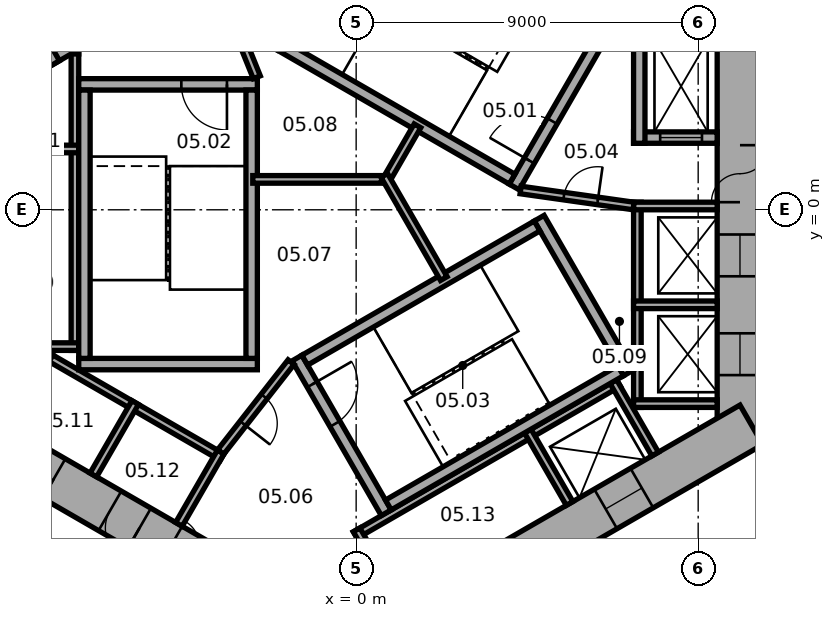
"""IFC4 building model, lengths in metres.
Left out: names, types, materials, properties, quantities, classifications, styles, units other than length and angle.
Written with IfcOpenShell. Run it as: python <this file> out.ifc"""

import sys

from ifc_helpers import new_model, si_unit, direction, frame, frame_2d, origin, place, context, subcontext, project, spatial, rectangle, extrude, element, fill, save


model = new_model("IFC4")
c1 = context("Model", 3, precision=1e-05, world=origin(), true_north=direction((0.0, 1.0)))
c2 = subcontext(c1, "Body", "Model", "MODEL_VIEW")
j1 = project(units=[si_unit("LENGTHUNIT", "METRE"), si_unit("PLANEANGLEUNIT", "RADIAN")], contexts=[c1])
p1 = place(None, origin())
s1 = spatial("IfcSite", under=j1, at=p1, CompositionType="ELEMENT")
p2 = place(p1, origin())
s2 = spatial("IfcBuilding", under=s1, at=p2, CompositionType="ELEMENT")
p3 = place(p2, frame((0.0, 0.0, 34.5)))
s3 = spatial("IfcBuildingStorey", under=s2, at=p3, CompositionType="ELEMENT", Elevation=34.5)
p4 = place(p3, frame((10.1, -6.177, 0.0), z_axis=(0.0, 0.0, 1.0), x_axis=(0.0, 1.0, 0.0)))
e1 = element("IfcWall", 1, at=p4, inside=s3, PredefinedType="SHEAR", context=c2, shape_type="SweptSolid", body=[
    extrude(rectangle(XDim=12.355, YDim=1.2, at=frame_2d((6.177, 0.0))), origin(), (0.0, 0.0, 1.0), 4.5),
])
p5 = place(p4, frame((6.378, 0.0, 0.0)))
e2 = element("IfcOpeningElement", 2, at=p5, cuts=e1, PredefinedType="OPENING", context=c2, shape_type="SweptSolid", body=[
    extrude(rectangle(XDim=1.5, YDim=2.1, at=frame_2d((0.75, 1.05))), frame((0.0, 0.61, 0.0), z_axis=(0.0, -1.0, 0.0), x_axis=(1.0, 0.0, 0.0)), (0.0, 0.0, 1.0), 1.22),
])
p6 = place(p4, frame((1.828, 0.0, 0.0)))
e3 = element("IfcOpeningElement", 3, at=p6, cuts=e1, PredefinedType="OPENING", context=c2, shape_type="SweptSolid", body=[
    extrude(rectangle(XDim=1.1, YDim=2.1, at=frame_2d((0.55, 1.05))), frame((0.0, 0.61, 0.0), z_axis=(0.0, -1.0, 0.0), x_axis=(1.0, 0.0, 0.0)), (0.0, 0.0, 1.0), 1.22),
])
p7 = place(p4, frame((4.427, 0.0, 0.0)))
e4 = element("IfcOpeningElement", 4, at=p7, cuts=e1, PredefinedType="OPENING", context=c2, shape_type="SweptSolid", body=[
    extrude(rectangle(XDim=1.1, YDim=2.1, at=frame_2d((0.55, 1.05))), frame((0.0, 0.61, 0.0), z_axis=(0.0, -1.0, 0.0), x_axis=(1.0, 0.0, 0.0)), (0.0, 0.0, 1.0), 1.22),
])
p8 = place(p3, frame((-10.4, -5.658, 0.0), z_axis=(0.0, 0.0, 1.0), x_axis=(0.866021384402, -0.500006961711, 0.0)))
e5 = element("IfcWall", 5, at=p8, inside=s3, PredefinedType="SHEAR", context=c2, shape_type="SweptSolid", body=[
    extrude(rectangle(XDim=12.355, YDim=1.2, at=frame_2d((6.178, 0.0))), origin(), (0.0, 0.0, 1.0), 4.5),
])
p9 = place(p8, frame((6.378, 0.0, 0.0)))
e6 = element("IfcOpeningElement", 6, at=p9, cuts=e5, PredefinedType="OPENING", context=c2, shape_type="SweptSolid", body=[
    extrude(rectangle(XDim=1.5, YDim=2.1, at=frame_2d((0.75, 1.05))), frame((0.0, 0.61, 0.0), z_axis=(0.0, -1.0, 0.0), x_axis=(1.0, 0.0, 0.0)), (0.0, 0.0, 1.0), 1.22),
])
p10 = place(p8, frame((1.928, 0.0, 0.0)))
e7 = element("IfcOpeningElement", 7, at=p10, cuts=e5, PredefinedType="OPENING", context=c2, shape_type="SweptSolid", body=[
    extrude(rectangle(XDim=0.9, YDim=2.1, at=frame_2d((0.45, 1.05))), frame((0.0, 0.61, 0.0), z_axis=(0.0, -1.0, 0.0), x_axis=(1.0, 0.0, 0.0)), (0.0, 0.0, 1.0), 1.22),
])
p11 = place(p8, frame((4.528, 0.0, 0.0)))
e8 = element("IfcOpeningElement", 8, at=p11, cuts=e5, PredefinedType="OPENING", context=c2, shape_type="SweptSolid", body=[
    extrude(rectangle(XDim=0.9, YDim=2.1, at=frame_2d((0.45, 1.05))), frame((0.0, 0.61, 0.0), z_axis=(0.0, -1.0, 0.0), x_axis=(1.0, 0.0, 0.0)), (0.0, 0.0, 1.0), 1.22),
])
p12 = place(p3, frame((-0.3, -11.836, 0.0), z_axis=(0.0, 0.0, 1.0), x_axis=(0.866021384402, 0.500006961711, 0.0)))
e9 = element("IfcWall", 9, at=p12, inside=s3, PredefinedType="SHEAR", context=c2, shape_type="SweptSolid", body=[
    extrude(rectangle(XDim=12.355, YDim=1.2, at=frame_2d((6.178, 0.0))), origin(), (0.0, 0.0, 1.0), 4.5),
])
p13 = place(p12, frame((4.128, 0.0, 0.0)))
e10 = element("IfcOpeningElement", 10, at=p13, cuts=e9, PredefinedType="OPENING", context=c2, shape_type="SweptSolid", body=[
    extrude(rectangle(XDim=0.9, YDim=2.1, at=frame_2d((0.45, 1.05))), frame((0.0, 0.61, 0.0), z_axis=(0.0, -1.0, 0.0), x_axis=(1.0, 0.0, 0.0)), (0.0, 0.0, 1.0), 1.22),
])
p14 = place(p12, frame((7.928, 0.0, 0.0)))
e11 = element("IfcOpeningElement", 11, at=p14, cuts=e9, PredefinedType="OPENING", context=c2, shape_type="SweptSolid", body=[
    extrude(rectangle(XDim=1.1, YDim=2.1, at=frame_2d((0.55, 1.05))), frame((0.0, 0.61, 0.0), z_axis=(0.0, -1.0, 0.0), x_axis=(1.0, 0.0, 0.0)), (0.0, 0.0, 1.0), 1.22),
])
p15 = place(p3, frame((7.4, -5.2, 0.0), z_axis=(0.0, 0.0, 1.0), x_axis=(0.0, 1.0, 0.0)))
e12 = element("IfcWall", 12, at=p15, inside=s3, PredefinedType="PARTITIONING", context=c2, shape_type="SweptSolid", body=[
    extrude(rectangle(XDim=5.4, YDim=0.2, at=frame_2d((2.7, 0.0))), origin(), (0.0, 0.0, 1.0), 4.2),
])
for number, where, z_axis, x_axis in (
    (13, (7.3, -5.1, 0.0), (0.0, 0.0, 1.0), (1.0, 0.0, 0.0)),
    (14, (7.3, -2.5, 0.0), (0.0, 0.0, 1.0), (1.0, 0.0, 0.0)),
    (15, (7.3, 0.1, 0.0), (0.0, 0.0, 1.0), (1.0, 0.0, 0.0)),
):
    element("IfcWall", number, at=place(p3, frame(where, z_axis=z_axis, x_axis=x_axis)), inside=s3, PredefinedType="PARTITIONING", context=c2, shape_type="SweptSolid", body=[
        extrude(rectangle(XDim=2.2, YDim=0.2, at=frame_2d((1.1, 0.0))), origin(), (0.0, 0.0, 1.0), 4.2),
    ])
p16 = place(p3, frame((-7.4, 4.3, 0.0), z_axis=(0.0, 0.0, 1.0), x_axis=(0.0, -1.0, 0.0)))
e16 = element("IfcWall", 16, at=p16, inside=s3, PredefinedType="PARTITIONING", context=c2, shape_type="SweptSolid", body=[
    extrude(rectangle(XDim=8.0, YDim=0.2, at=frame_2d((4.0, 0.0))), origin(), (0.0, 0.0, 1.0), 4.2),
])
for number, where, z_axis, x_axis in (
    (17, (-7.3, 4.2, 0.0), (0.0, 0.0, 1.0), (-1.0, 0.0, 0.0)),
    (18, (-7.3, 1.6, 0.0), (0.0, 0.0, 1.0), (-1.0, 0.0, 0.0)),
    (19, (-7.3, -3.6, 0.0), (0.0, 0.0, 1.0), (-1.0, 0.0, 0.0)),
):
    element("IfcWall", number, at=place(p3, frame(where, z_axis=z_axis, x_axis=x_axis)), inside=s3, PredefinedType="PARTITIONING", context=c2, shape_type="SweptSolid", body=[
        extrude(rectangle(XDim=2.2, YDim=0.2, at=frame_2d((1.1, 0.0))), origin(), (0.0, 0.0, 1.0), 4.2),
    ])
p17 = place(p3, frame((-8.203, -3.809, 0.0), z_axis=(0.0, 0.0, 1.0), x_axis=(0.866028230842, -0.499995103361, 0.0)))
e20 = element("IfcWall", 20, at=p17, inside=s3, PredefinedType="PARTITIONING", context=c2, shape_type="SweptSolid", body=[
    extrude(rectangle(XDim=5.4, YDim=0.2, at=frame_2d((2.7, 0.0))), origin(), (0.0, 0.0, 1.0), 4.2),
])
for number, where, z_axis, x_axis in (
    (21, (-8.067, -3.772, 0.0), (0.0, 0.0, 1.0), (-0.5, -0.866, 0.0)),
    (22, (-5.815, -5.072, 0.0), (0.0, 0.0, 1.0), (-0.5, -0.866, 0.0)),
):
    element("IfcWall", number, at=place(p3, frame(where, z_axis=z_axis, x_axis=x_axis)), inside=s3, PredefinedType="PARTITIONING", context=c2, shape_type="SweptSolid", body=[
        extrude(rectangle(XDim=2.2, YDim=0.2, at=frame_2d((1.1, 0.0))), origin(), (0.0, 0.0, 1.0), 4.2),
    ])
p18 = place(p3, frame((-3.563, -6.372, 0.0), z_axis=(0.0, 0.0, 1.0), x_axis=(-0.499994660107, -0.866028486751, 0.0)))
e23 = element("IfcWall", 23, at=p18, inside=s3, PredefinedType="PARTITIONING", context=c2, shape_type="SweptSolid", body=[
    extrude(rectangle(XDim=2.2, YDim=0.2, at=frame_2d((1.1, 0.0))), origin(), (0.0, 0.0, 1.0), 4.2),
])
p19 = place(p3, frame((-0.024, -8.559, 0.0), z_axis=(0.0, 0.0, 1.0), x_axis=(0.866026010844, 0.49999894854, 0.0)))
e24 = element("IfcWall", 24, at=p19, inside=s3, PredefinedType="PARTITIONING", context=c2, shape_type="SweptSolid", body=[
    extrude(rectangle(XDim=8.0, YDim=0.2, at=frame_2d((4.0, 0.0))), origin(), (0.0, 0.0, 1.0), 4.2),
])
for number, where, z_axis, x_axis in (
    (25, (0.013, -8.422, 0.0), (0.0, 0.0, 1.0), (0.5, -0.866, 0.0)),
    (26, (4.516, -5.822, 0.0), (0.0, 0.0, 1.0), (0.5, -0.866, 0.0)),
    (27, (6.768, -4.522, 0.0), (0.0, 0.0, 1.0), (0.5, -0.866, 0.0)),
):
    element("IfcWall", number, at=place(p3, frame(where, z_axis=z_axis, x_axis=x_axis)), inside=s3, PredefinedType="PARTITIONING", context=c2, shape_type="SweptSolid", body=[
        extrude(rectangle(XDim=2.2, YDim=0.2, at=frame_2d((1.1, 0.0))), origin(), (0.0, 0.0, 1.0), 4.2),
    ])
p20 = place(p3, frame((4.158, 0.602, 0.0), z_axis=(0.0, 0.0, 1.0), x_axis=(0.499977259774, 0.866038532462, 0.0)))
e28 = element("IfcWall", 28, at=p20, inside=s3, PredefinedType="SHEAR", context=c2, shape_type="SweptSolid", body=[
    extrude(rectangle(XDim=4.7, YDim=0.3, at=frame_2d((2.35, 0.0))), origin(), (0.0, 0.0, 1.0), 4.2),
])
p21 = place(p20, frame((0.8, 0.0, 0.0)))
e29 = element("IfcOpeningElement", 29, at=p21, cuts=e28, PredefinedType="OPENING", context=c2, shape_type="SweptSolid", body=[
    extrude(rectangle(XDim=1.2, YDim=2.1, at=frame_2d((0.6, 1.05))), frame((0.0, 0.16, 0.0), z_axis=(0.0, -1.0, 0.0), x_axis=(1.0, 0.0, 0.0)), (0.0, 0.0, 1.0), 0.32),
])
p22 = place(p3, frame((4.103, 0.807, 0.0), z_axis=(0.0, 0.0, 1.0), x_axis=(-0.866027801685, 0.499995846692, 0.0)))
e30 = element("IfcWall", 30, at=p22, inside=s3, PredefinedType="SHEAR", context=c2, shape_type="SweptSolid", body=[
    extrude(rectangle(XDim=7.06, YDim=0.3, at=frame_2d((3.53, 0.0))), origin(), (0.0, 0.0, 1.0), 4.2),
])
p23 = place(p3, frame((-2.6, 3.3, 0.0), z_axis=(0.0, 0.0, 1.0), x_axis=(-1.0, 0.0, 0.0)))
e31 = element("IfcWall", 31, at=p23, inside=s3, PredefinedType="SHEAR", context=c2, shape_type="SweptSolid", body=[
    extrude(rectangle(XDim=4.7, YDim=0.3, at=frame_2d((2.35, 0.0))), origin(), (0.0, 0.0, 1.0), 4.2),
])
p24 = place(p23, frame((0.8, 0.0, 0.0)))
e32 = element("IfcOpeningElement", 32, at=p24, cuts=e31, PredefinedType="OPENING", context=c2, shape_type="SweptSolid", body=[
    extrude(rectangle(XDim=1.2, YDim=2.1, at=frame_2d((0.6, 1.05))), frame((0.0, 0.16, 0.0), z_axis=(0.0, -1.0, 0.0), x_axis=(1.0, 0.0, 0.0)), (0.0, 0.0, 1.0), 0.32),
])
p25 = place(p3, frame((-2.6, -4.06, 0.0), z_axis=(0.0, 0.0, 1.0), x_axis=(-1.0, 0.0, 0.0)))
e33 = element("IfcWall", 33, at=p25, inside=s3, PredefinedType="SHEAR", context=c2, shape_type="SweptSolid", body=[
    extrude(rectangle(XDim=4.7, YDim=0.3, at=frame_2d((2.35, 0.0))), origin(), (0.0, 0.0, 1.0), 4.2),
])
for number, where, z_axis, x_axis in (
    (34, (-2.75, 3.15, 0.0), (0.0, 0.0, 1.0), (0.0, -1.0, 0.0)),
    (35, (-7.15, 3.15, 0.0), (0.0, 0.0, 1.0), (0.0, -1.0, 0.0)),
):
    element("IfcWall", number, at=place(p3, frame(where, z_axis=z_axis, x_axis=x_axis)), inside=s3, PredefinedType="SHEAR", context=c2, shape_type="SweptSolid", body=[
        extrude(rectangle(XDim=7.06, YDim=0.3, at=frame_2d((3.53, 0.0))), origin(), (0.0, 0.0, 1.0), 4.2),
    ])
p26 = place(p3, frame((-1.558, -3.902, 0.0), z_axis=(0.0, 0.0, 1.0), x_axis=(0.499977259774, -0.866038532462, 0.0)))
e36 = element("IfcWall", 36, at=p26, inside=s3, PredefinedType="SHEAR", context=c2, shape_type="SweptSolid", body=[
    extrude(rectangle(XDim=4.7, YDim=0.3, at=frame_2d((2.35, 0.0))), origin(), (0.0, 0.0, 1.0), 4.2),
])
p27 = place(p26, frame((0.8, 0.0, 0.0)))
e37 = element("IfcOpeningElement", 37, at=p27, cuts=e36, PredefinedType="OPENING", context=c2, shape_type="SweptSolid", body=[
    extrude(rectangle(XDim=1.2, YDim=2.1, at=frame_2d((0.6, 1.05))), frame((0.0, 0.16, 0.0), z_axis=(0.0, -1.0, 0.0), x_axis=(1.0, 0.0, 0.0)), (0.0, 0.0, 1.0), 0.32),
])
p28 = place(p3, frame((4.816, -0.222, 0.0), z_axis=(0.0, 0.0, 1.0), x_axis=(0.499977259774, -0.866038532462, 0.0)))
e38 = element("IfcWall", 38, at=p28, inside=s3, PredefinedType="SHEAR", context=c2, shape_type="SweptSolid", body=[
    extrude(rectangle(XDim=4.7, YDim=0.3, at=frame_2d((2.35, 0.0))), origin(), (0.0, 0.0, 1.0), 4.2),
])
for number, where, z_axis, x_axis in (
    (39, (-1.353, -3.957, 0.0), (0.0, 0.0, 1.0), (0.866, 0.5, 0.0)),
    (40, (0.847, -7.767, 0.0), (0.0, 0.0, 1.0), (0.866, 0.5, 0.0)),
):
    element("IfcWall", number, at=place(p3, frame(where, z_axis=z_axis, x_axis=x_axis)), inside=s3, PredefinedType="SHEAR", context=c2, shape_type="SweptSolid", body=[
        extrude(rectangle(XDim=7.06, YDim=0.3, at=frame_2d((3.53, 0.0))), origin(), (0.0, 0.0, 1.0), 4.2),
    ])
p29 = place(p3, frame((7.3, 1.9, 0.0), z_axis=(0.0, 0.0, 1.0), x_axis=(1.0, 0.0, 0.0)))
e41 = element("IfcWall", 41, at=p29, inside=s3, PredefinedType="SHEAR", context=c2, shape_type="SweptSolid", body=[
    extrude(rectangle(XDim=2.2, YDim=0.3, at=frame_2d((1.1, 0.0))), origin(), (0.0, 0.0, 1.0), 4.2),
])
p30 = place(p29, frame((0.7, 0.0, 0.0)))
e42 = element("IfcOpeningElement", 42, at=p30, cuts=e41, PredefinedType="OPENING", context=c2, shape_type="SweptSolid", body=[
    extrude(rectangle(XDim=1.1, YDim=2.1, at=frame_2d((0.55, 1.05))), frame((0.0, 0.16, 0.0), z_axis=(0.0, -1.0, 0.0), x_axis=(1.0, 0.0, 0.0)), (0.0, 0.0, 1.0), 0.32),
])
p31 = place(p3, frame((7.45, 1.75, 0.0), z_axis=(0.0, 0.0, 1.0), x_axis=(0.0, 1.0, 0.0)))
e43 = element("IfcWall", 43, at=p31, inside=s3, PredefinedType="SHEAR", context=c2, shape_type="SweptSolid", body=[
    extrude(rectangle(XDim=3.35, YDim=0.3, at=frame_2d((1.675, 0.0))), origin(), (0.0, 0.0, 1.0), 4.2),
])
p32 = place(p3, frame((4.327, 0.521, 0.0), z_axis=(0.0, 0.0, 1.0), x_axis=(0.990124376366, -0.14019172346, 0.0)))
e44 = element("IfcWall", 44, at=p32, inside=s3, PredefinedType="PARTITIONING", context=c2, shape_type="SweptSolid", body=[
    extrude(rectangle(XDim=3.002, YDim=0.2, at=frame_2d((1.501, 0.0))), origin(), (0.0, 0.0, 1.0), 4.2),
])
p33 = place(p32, frame((1.15, 0.0, 0.0)))
e45 = element("IfcOpeningElement", 45, at=p33, cuts=e44, PredefinedType="OPENING", context=c2, shape_type="SweptSolid", body=[
    extrude(rectangle(XDim=0.9, YDim=2.1, at=frame_2d((0.45, 1.05))), frame((0.0, 0.11, 0.0), z_axis=(0.0, -1.0, 0.0), x_axis=(1.0, 0.0, 0.0)), (0.0, 0.0, 1.0), 0.22),
])
p34 = place(p3, frame((-5.24, 5.577, 0.0), z_axis=(0.0, 0.0, 1.0), x_axis=(-0.866014461049, -0.500018952895, 0.0)))
e46 = element("IfcWall", 46, at=p34, inside=s3, PredefinedType="SHEAR", context=c2, shape_type="SweptSolid", body=[
    extrude(rectangle(XDim=3.35, YDim=0.3, at=frame_2d((1.675, 0.0))), origin(), (0.0, 0.0, 1.0), 4.2),
])
p35 = place(p3, frame((-7.937, 3.847, 0.0), z_axis=(0.0, 0.0, 1.0), x_axis=(-0.50002983664, 0.866008176907, 0.0)))
e47 = element("IfcWall", 47, at=p35, inside=s3, PredefinedType="SHEAR", context=c2, shape_type="SweptSolid", body=[
    extrude(rectangle(XDim=2.2, YDim=0.3, at=frame_2d((1.1, 0.0))), origin(), (0.0, 0.0, 1.0), 4.2),
])
p36 = place(p3, frame((-2.615, 3.487, 0.0), z_axis=(0.0, 0.0, 1.0), x_axis=(-0.373576831041, 0.92759924068, 0.0)))
e48 = element("IfcWall", 48, at=p36, inside=s3, PredefinedType="PARTITIONING", context=c2, shape_type="SweptSolid", body=[
    extrude(rectangle(XDim=3.002, YDim=0.2, at=frame_2d((1.501, 0.0))), origin(), (0.0, 0.0, 1.0), 4.2),
])
p37 = place(p36, frame((1.15, 0.0, 0.0)))
e49 = element("IfcOpeningElement", 49, at=p37, cuts=e48, PredefinedType="OPENING", context=c2, shape_type="SweptSolid", body=[
    extrude(rectangle(XDim=0.9, YDim=2.1, at=frame_2d((0.45, 1.05))), frame((0.0, 0.11, 0.0), z_axis=(0.0, -1.0, 0.0), x_axis=(1.0, 0.0, 0.0)), (0.0, 0.0, 1.0), 0.22),
])
p38 = place(p3, frame((-1.712, -4.008, 0.0), z_axis=(0.0, 0.0, 1.0), x_axis=(-0.616549420702, -0.787316208287, 0.0)))
e50 = element("IfcWall", 50, at=p38, inside=s3, PredefinedType="PARTITIONING", context=c2, shape_type="SweptSolid", body=[
    extrude(rectangle(XDim=3.002, YDim=0.2, at=frame_2d((1.501, 0.0))), origin(), (0.0, 0.0, 1.0), 4.2),
])
p39 = place(p38, frame((1.15, 0.0, 0.0)))
e51 = element("IfcOpeningElement", 51, at=p39, cuts=e50, PredefinedType="OPENING", context=c2, shape_type="SweptSolid", body=[
    extrude(rectangle(XDim=0.9, YDim=2.1, at=frame_2d((0.45, 1.05))), frame((0.0, 0.11, 0.0), z_axis=(0.0, -1.0, 0.0), x_axis=(1.0, 0.0, 0.0)), (0.0, 0.0, 1.0), 0.22),
])
p40 = place(p3, frame((0.92, 0.8, 0.0), z_axis=(0.0, 0.0, 1.0), x_axis=(-1.0, 0.0, 0.0)))
e52 = element("IfcWall", 52, at=p40, inside=s3, PredefinedType="PARTITIONING", context=c2, shape_type="SweptSolid", body=[
    extrude(rectangle(XDim=3.64, YDim=0.2, at=frame_2d((1.82, 0.0))), origin(), (0.0, 0.0, 1.0), 4.2),
])
p41 = place(p3, frame((0.74, 0.696, 0.0), z_axis=(0.0, 0.0, 1.0), x_axis=(0.499956301907, 0.86605063142, 0.0)))
e53 = element("IfcWall", 53, at=p41, inside=s3, PredefinedType="PARTITIONING", context=c2, shape_type="SweptSolid", body=[
    extrude(rectangle(XDim=1.747, YDim=0.2, at=frame_2d((0.874, 0.0))), origin(), (0.0, 0.0, 1.0), 4.2),
])
p42 = place(p3, frame((0.74, 0.904, 0.0), z_axis=(0.0, 0.0, 1.0), x_axis=(0.500028278809, -0.866009076391, 0.0)))
e54 = element("IfcWall", 54, at=p42, inside=s3, PredefinedType="PARTITIONING", context=c2, shape_type="SweptSolid", body=[
    extrude(rectangle(XDim=3.133, YDim=0.2, at=frame_2d((1.566, 0.0))), origin(), (0.0, 0.0, 1.0), 4.2),
])
p43 = place(p3, frame((-7.395, -11.55, 0.0), z_axis=(0.0, 0.0, 1.0), x_axis=(-0.86601459857, 0.500018714713, 0.0)))
e55 = element("IfcWall", 55, at=p43, inside=s3, PredefinedType="SOLIDWALL", context=c2, shape_type="SweptSolid", body=[
    extrude(rectangle(XDim=7.181, YDim=0.25, at=frame_2d((3.59, 0.0))), origin(), (0.0, 0.0, 1.0), 4.2),
])
p44 = place(p43, frame((5.231, 0.0, 0.0)))
e56 = element("IfcOpeningElement", 56, at=p44, cuts=e55, PredefinedType="OPENING", context=c2, shape_type="SweptSolid", body=[
    extrude(rectangle(XDim=1.4, YDim=2.1, at=frame_2d((0.7, 1.05))), frame((0.0, 0.135, 0.0), z_axis=(0.0, -1.0, 0.0), x_axis=(1.0, 0.0, 0.0)), (0.0, 0.0, 1.0), 0.27),
])
p45 = place(p5, origin())
e57 = element("IfcDoor", 57, at=p45, inside=s3, OperationType="DOUBLE_DOOR_SINGLE_SWING", PredefinedType="DOOR", context=c2, shape_type="SweptSolid", body=[
    extrude(rectangle(XDim=1.5, YDim=2.1, at=frame_2d((0.75, 1.05))), frame((0.0, 0.025, 0.0), z_axis=(0.0, -1.0, 0.0), x_axis=(1.0, 0.0, 0.0)), (0.0, 0.0, 1.0), 0.05),
])
fill(e2, e57)
p46 = place(p21, origin())
e58 = element("IfcDoor", 58, at=p46, inside=s3, OperationType="SINGLE_SWING_RIGHT", PredefinedType="DOOR", context=c2, shape_type="SweptSolid", body=[
    extrude(rectangle(XDim=1.2, YDim=2.1, at=frame_2d((0.6, 1.05))), frame((0.0, 0.025, 0.0), z_axis=(0.0, -1.0, 0.0), x_axis=(1.0, 0.0, 0.0)), (0.0, 0.0, 1.0), 0.05),
])
fill(e29, e58)
p47 = place(p24, origin())
e59 = element("IfcDoor", 59, at=p47, inside=s3, OperationType="SINGLE_SWING_RIGHT", PredefinedType="DOOR", context=c2, shape_type="SweptSolid", body=[
    extrude(rectangle(XDim=1.2, YDim=2.1, at=frame_2d((0.6, 1.05))), frame((0.0, 0.025, 0.0), z_axis=(0.0, -1.0, 0.0), x_axis=(1.0, 0.0, 0.0)), (0.0, 0.0, 1.0), 0.05),
])
fill(e32, e59)
p48 = place(p27, origin())
e60 = element("IfcDoor", 60, at=p48, inside=s3, OperationType="SINGLE_SWING_RIGHT", PredefinedType="DOOR", context=c2, shape_type="SweptSolid", body=[
    extrude(rectangle(XDim=1.2, YDim=2.1, at=frame_2d((0.6, 1.05))), frame((0.0, 0.025, 0.0), z_axis=(0.0, -1.0, 0.0), x_axis=(1.0, 0.0, 0.0)), (0.0, 0.0, 1.0), 0.05),
])
fill(e37, e60)
p49 = place(p33, origin())
e61 = element("IfcDoor", 61, at=p49, inside=s3, OperationType="SINGLE_SWING_LEFT", PredefinedType="DOOR", context=c2, shape_type="SweptSolid", body=[
    extrude(rectangle(XDim=0.9, YDim=2.1, at=frame_2d((0.45, 1.05))), frame((0.0, 0.025, 0.0), z_axis=(0.0, -1.0, 0.0), x_axis=(1.0, 0.0, 0.0)), (0.0, 0.0, 1.0), 0.05),
])
fill(e45, e61)
p50 = place(p39, origin())
e62 = element("IfcDoor", 62, at=p50, inside=s3, OperationType="SINGLE_SWING_LEFT", PredefinedType="DOOR", context=c2, shape_type="SweptSolid", body=[
    extrude(rectangle(XDim=0.9, YDim=2.1, at=frame_2d((0.45, 1.05))), frame((0.0, 0.025, 0.0), z_axis=(0.0, -1.0, 0.0), x_axis=(1.0, 0.0, 0.0)), (0.0, 0.0, 1.0), 0.05),
])
fill(e51, e62)
p51 = place(p10, origin())
e63 = element("IfcDoor", 63, at=p51, inside=s3, OperationType="SINGLE_SWING_LEFT", PredefinedType="DOOR", context=c2, shape_type="SweptSolid", body=[
    extrude(rectangle(XDim=0.9, YDim=2.1, at=frame_2d((0.45, 1.05))), frame((0.0, 0.025, 0.0), z_axis=(0.0, -1.0, 0.0), x_axis=(1.0, 0.0, 0.0)), (0.0, 0.0, 1.0), 0.05),
])
fill(e7, e63)
p52 = place(p11, origin())
e64 = element("IfcDoor", 64, at=p52, inside=s3, OperationType="SINGLE_SWING_LEFT", PredefinedType="DOOR", context=c2, shape_type="SweptSolid", body=[
    extrude(rectangle(XDim=0.9, YDim=2.1, at=frame_2d((0.45, 1.05))), frame((0.0, 0.025, 0.0), z_axis=(0.0, -1.0, 0.0), x_axis=(1.0, 0.0, 0.0)), (0.0, 0.0, 1.0), 0.05),
])
fill(e8, e64)
p53 = place(p30, origin())
e65 = element("IfcDoor", 65, at=p53, inside=s3, OperationType="DOUBLE_DOOR_SLIDING", PredefinedType="DOOR", context=c2, shape_type="SweptSolid", body=[
    extrude(rectangle(XDim=1.1, YDim=2.1, at=frame_2d((0.55, 1.05))), frame((0.0, 0.025, 0.0), z_axis=(0.0, -1.0, 0.0), x_axis=(1.0, 0.0, 0.0)), (0.0, 0.0, 1.0), 0.05),
])
fill(e42, e65)
p54 = place(p6, origin())
e66 = element("IfcDoor", 66, at=p54, inside=s3, OperationType="DOUBLE_DOOR_SLIDING", PredefinedType="DOOR", context=c2, shape_type="SweptSolid", body=[
    extrude(rectangle(XDim=1.1, YDim=2.1, at=frame_2d((0.55, 1.05))), frame((0.0, 0.025, 0.0), z_axis=(0.0, -1.0, 0.0), x_axis=(1.0, 0.0, 0.0)), (0.0, 0.0, 1.0), 0.05),
])
fill(e3, e66)
p55 = place(p7, origin())
e67 = element("IfcDoor", 67, at=p55, inside=s3, OperationType="DOUBLE_DOOR_SLIDING", PredefinedType="DOOR", context=c2, shape_type="SweptSolid", body=[
    extrude(rectangle(XDim=1.1, YDim=2.1, at=frame_2d((0.55, 1.05))), frame((0.0, 0.025, 0.0), z_axis=(0.0, -1.0, 0.0), x_axis=(1.0, 0.0, 0.0)), (0.0, 0.0, 1.0), 0.05),
])
fill(e4, e67)
p56 = place(p14, origin())
e68 = element("IfcDoor", 68, at=p56, inside=s3, OperationType="DOUBLE_DOOR_SLIDING", PredefinedType="DOOR", context=c2, shape_type="SweptSolid", body=[
    extrude(rectangle(XDim=1.1, YDim=2.1, at=frame_2d((0.55, 1.05))), frame((0.0, 0.025, 0.0), z_axis=(0.0, -1.0, 0.0), x_axis=(1.0, 0.0, 0.0)), (0.0, 0.0, 1.0), 0.05),
])
fill(e11, e68)
save(model, sys.argv[1])
